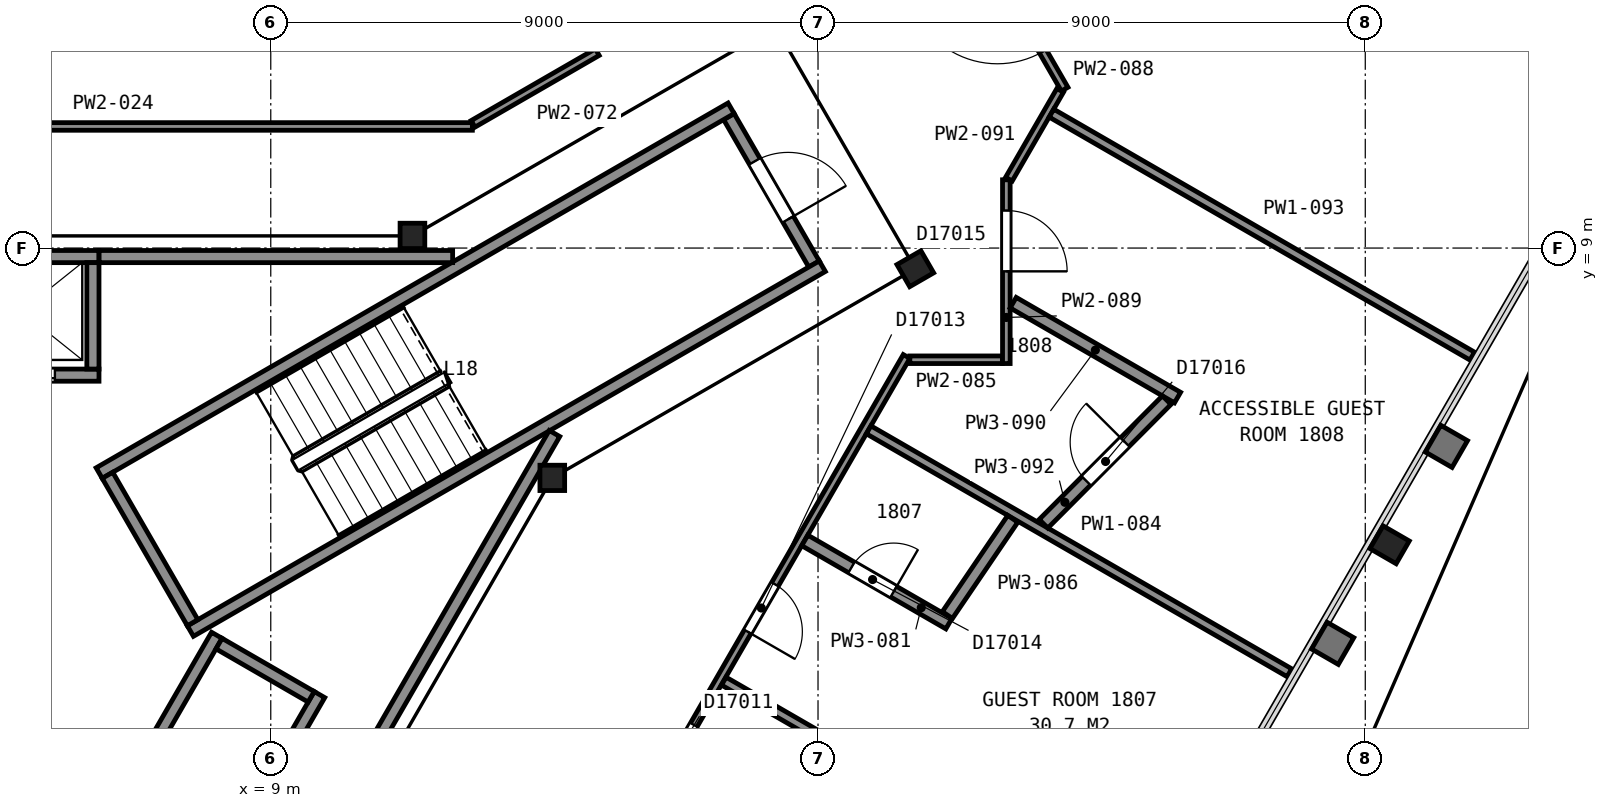
"""IFC4 building model, lengths in metres.
Left out: names, types, materials, properties, quantities, classifications, styles, units other than length and angle.
Written with IfcOpenShell. Run it as: python <this file> out.ifc"""

import sys

from ifc_helpers import new_model, si_unit, direction, frame, frame_2d, origin, origin_2d, place, context, subcontext, project, spatial, rectangle, i_section, extrude, element, fill, save


model = new_model("IFC4")
c1 = context("Model", 3, precision=1e-05, world=origin(), true_north=direction((0.0, 1.0)))
c2 = subcontext(c1, "Body", "Model", "MODEL_VIEW")
j1 = project(units=[si_unit("LENGTHUNIT", "METRE"), si_unit("PLANEANGLEUNIT", "RADIAN")], contexts=[c1])
p1 = place(None, origin())
s1 = spatial("IfcSite", under=j1, at=p1, CompositionType="ELEMENT")
p2 = place(p1, origin())
s2 = spatial("IfcBuilding", under=s1, at=p2, CompositionType="ELEMENT")
p3 = place(p2, frame((0.0, 0.0, 80.0)))
s3 = spatial("IfcBuildingStorey", under=s2, at=p3, CompositionType="ELEMENT", Elevation=80.0)
p4 = place(p3, frame((27.4, 4.12, 0.0), z_axis=(0.0, 0.0, 1.0), x_axis=(-0.5, -0.866025403784, 0.0)))
e1 = element("IfcColumn", 1, at=p4, inside=s3, PredefinedType="COLUMN", context=c2, shape_type="SweptSolid", body=[
    extrude(i_section(OverallWidth=0.432, OverallDepth=0.498, WebThickness=0.056, FlangeThickness=0.089, FilletRadius=0.015, at=origin_2d()), origin(), (0.0, 0.0, 1.0), 3.6),
])
p5 = place(p3, frame((13.63, 5.22, 0.0), z_axis=(0.0, 0.0, 1.0), x_axis=(1.0, 0.0, 0.0)))
e2 = element("IfcColumn", 2, at=p5, inside=s3, PredefinedType="COLUMN", context=c2, shape_type="SweptSolid", body=[
    extrude(i_section(OverallWidth=0.406, OverallDepth=0.417, WebThickness=0.03, FlangeThickness=0.048, FilletRadius=0.015, at=origin_2d()), origin(), (0.0, 0.0, 1.0), 3.6),
])
p6 = place(p3, frame((19.6, 8.66, 0.0), z_axis=(0.0, 0.0, 1.0), x_axis=(0.5, -0.866025403784, 0.0)))
e3 = element("IfcColumn", 3, at=p6, inside=s3, PredefinedType="COLUMN", context=c2, shape_type="SweptSolid", body=[
    extrude(i_section(OverallWidth=0.419, OverallDepth=0.455, WebThickness=0.042, FlangeThickness=0.068, FilletRadius=0.015, at=origin_2d()), origin(), (0.0, 0.0, 1.0), 3.6),
])
p7 = place(p3, frame((11.33, 9.2, 0.0), z_axis=(0.0, 0.0, 1.0), x_axis=(1.0, 0.0, 0.0)))
e4 = element("IfcColumn", 4, at=p7, inside=s3, PredefinedType="COLUMN", context=c2, shape_type="SweptSolid", body=[
    extrude(i_section(OverallWidth=0.406, OverallDepth=0.417, WebThickness=0.03, FlangeThickness=0.048, FilletRadius=0.015, at=origin_2d()), origin(), (0.0, 0.0, 1.0), 3.6),
])
p8 = place(p3, frame((17.934, 8.738, 0.0), z_axis=(0.0, 0.0, 1.0), x_axis=(-0.49998411664, 0.866034573852, 0.0)))
e5 = element("IfcWall", 5, at=p8, inside=s3, PredefinedType="PARTITIONING", context=c2, shape_type="SweptSolid", body=[
    extrude(rectangle(XDim=2.8, YDim=0.2, at=frame_2d((1.4, 0.0))), origin(), (0.0, 0.0, 1.0), 3.35),
])
p9 = place(p8, frame((0.85, 0.0, 0.0)))
e6 = element("IfcOpeningElement", 6, at=p9, cuts=e5, PredefinedType="OPENING", context=c2, shape_type="SweptSolid", body=[
    extrude(rectangle(XDim=1.1, YDim=2.1, at=frame_2d((0.55, 1.05))), frame((0.0, 0.11, 0.0), z_axis=(0.0, -1.0, 0.0), x_axis=(1.0, 0.0, 0.0)), (0.0, 0.0, 1.0), 0.22),
])
for number, where, z_axis, x_axis in (
    (7, (6.178, 5.299, 0.0), (0.0, 0.0, 1.0), (0.866, 0.5, 0.0)),
    (8, (7.678, 2.701, 0.0), (0.0, 0.0, 1.0), (0.866, 0.5, 0.0)),
):
    element("IfcWall", number, at=place(p3, frame(where, z_axis=z_axis, x_axis=x_axis)), inside=s3, PredefinedType="PARTITIONING", context=c2, shape_type="SweptSolid", body=[
        extrude(rectangle(XDim=12.0, YDim=0.2, at=frame_2d((6.0, 0.0))), origin(), (0.0, 0.0, 1.0), 3.35),
    ])
p10 = place(p3, frame((7.715, 2.838, 0.0), z_axis=(0.0, 0.0, 1.0), x_axis=(-0.500049511043, 0.865996816683, 0.0)))
e9 = element("IfcWall", 9, at=p10, inside=s3, PredefinedType="PARTITIONING", context=c2, shape_type="SweptSolid", body=[
    extrude(rectangle(XDim=2.8, YDim=0.2, at=frame_2d((1.4, 0.0))), origin(), (0.0, 0.0, 1.0), 3.35),
])
p11 = place(p3, frame((3.625, 6.91, 0.0), z_axis=(0.0, 0.0, 1.0), x_axis=(1.0, 0.0, 0.0)))
e10 = element("IfcWall", 10, at=p11, inside=s3, PredefinedType="PARTITIONING", context=c2, shape_type="SweptSolid", body=[
    extrude(rectangle(XDim=2.55, YDim=0.2, at=frame_2d((1.275, 0.0))), origin(), (0.0, 0.0, 1.0), 3.6),
])
p12 = place(p11, frame((0.725, 0.0, 0.0)))
e11 = element("IfcOpeningElement", 11, at=p12, cuts=e10, PredefinedType="OPENING", context=c2, shape_type="SweptSolid", body=[
    extrude(rectangle(XDim=1.1, YDim=2.1, at=frame_2d((0.55, 1.05))), frame((0.0, 0.11, 0.0), z_axis=(0.0, -1.0, 0.0), x_axis=(1.0, 0.0, 0.0)), (0.0, 0.0, 1.0), 0.22),
])
p13 = place(p3, frame((3.625, 8.86, 0.0), z_axis=(0.0, 0.0, 1.0), x_axis=(1.0, 0.0, 0.0)))
e12 = element("IfcWall", 12, at=p13, inside=s3, PredefinedType="PARTITIONING", context=c2, shape_type="SweptSolid", body=[
    extrude(rectangle(XDim=2.55, YDim=0.2, at=frame_2d((1.275, 0.0))), origin(), (0.0, 0.0, 1.0), 3.6),
])
p14 = place(p3, frame((7.451, -2.414, 0.0), z_axis=(0.0, 0.0, 1.0), x_axis=(0.500016218704, 0.866016039709, 0.0)))
e13 = element("IfcWall", 13, at=p14, inside=s3, PredefinedType="PARTITIONING", context=c2, shape_type="SweptSolid", body=[
    extrude(rectangle(XDim=4.7, YDim=0.2, at=frame_2d((2.35, 0.0))), origin(), (0.0, 0.0, 1.0), 3.6),
])
p15 = place(p3, frame((5.663, -1.612, 0.0), z_axis=(0.0, 0.0, 1.0), x_axis=(0.49998122708, 0.866036242063, 0.0)))
e14 = element("IfcWall", 14, at=p15, inside=s3, PredefinedType="PARTITIONING", context=c2, shape_type="SweptSolid", body=[
    extrude(rectangle(XDim=4.9, YDim=0.2, at=frame_2d((2.45, 0.0))), origin(), (0.0, 0.0, 1.0), 3.6),
])
p16 = place(p3, frame((6.075, 7.01, 0.0), z_axis=(0.0, 0.0, 1.0), x_axis=(0.0, 1.0, 0.0)))
e15 = element("IfcWall", 15, at=p16, inside=s3, PredefinedType="PARTITIONING", context=c2, shape_type="SweptSolid", body=[
    extrude(rectangle(XDim=1.75, YDim=0.2, at=frame_2d((0.875, 0.0))), origin(), (0.0, 0.0, 1.0), 3.6),
])
p17 = place(p3, frame((9.665, 1.62, 0.0), z_axis=(0.0, 0.0, 1.0), x_axis=(-0.866002029911, 0.500040482552, 0.0)))
e16 = element("IfcWall", 16, at=p17, inside=s3, PredefinedType="PARTITIONING", context=c2, shape_type="SweptSolid", body=[
    extrude(rectangle(XDim=1.75, YDim=0.2, at=frame_2d((0.875, 0.0))), origin(), (0.0, 0.0, 1.0), 3.6),
])
p18 = place(p3, frame((6.177, 8.86, 0.0), z_axis=(0.0, 0.0, 1.0), x_axis=(1.0, 0.0, 0.0)))
e17 = element("IfcWall", 17, at=p18, inside=s3, PredefinedType="PARTITIONING", context=c2, shape_type="SweptSolid", body=[
    extrude(rectangle(XDim=5.814, YDim=0.2, at=frame_2d((2.907, 0.0))), origin(), (0.0, 0.0, 1.0), 3.35),
])
p19 = place(p3, frame((8.492, -3.012, 0.0), z_axis=(0.0, 0.0, 1.0), x_axis=(0.499972957231, 0.866041016371, 0.0)))
e18 = element("IfcWall", 18, at=p19, inside=s3, PredefinedType="PARTITIONING", context=c2, shape_type="SweptSolid", body=[
    extrude(rectangle(XDim=10.349, YDim=0.2, at=frame_2d((5.174, 0.0))), origin(), (0.0, 0.0, 1.0), 3.35),
])
p20 = place(p3, frame((-12.315, 11.0, 0.0), z_axis=(0.0, 0.0, 1.0), x_axis=(1.0, 0.0, 0.0)))
e19 = element("IfcWall", 19, at=p20, inside=s3, PredefinedType="PARTITIONING", context=c2, shape_type="SweptSolid", body=[
    extrude(rectangle(XDim=24.631, YDim=0.125, at=frame_2d((12.315, 0.0))), origin(), (0.0, 0.0, 1.0), 2.613),
])
p21 = place(p20, frame((11.812, 0.0, 0.0)))
e20 = element("IfcOpeningElement", 20, at=p21, cuts=e19, PredefinedType="OPENING", context=c2, shape_type="SweptSolid", body=[
    extrude(rectangle(XDim=1.0, YDim=2.1, at=frame_2d((0.5, 1.05))), frame((0.0, 0.073, 0.0), z_axis=(0.0, -1.0, 0.0), x_axis=(1.0, 0.0, 0.0)), (0.0, 0.0, 1.0), 0.145),
])
p22 = place(p3, frame((19.456, 7.217, 0.0), z_axis=(0.0, 0.0, 1.0), x_axis=(-0.50002170027, -0.866012874765, 0.0)))
e21 = element("IfcWall", 21, at=p22, inside=s3, PredefinedType="PARTITIONING", context=c2, shape_type="SweptSolid", body=[
    extrude(rectangle(XDim=31.379, YDim=0.125, at=frame_2d((15.69, 0.0))), origin(), (0.0, 0.0, 1.0), 2.613),
])
p23 = place(p22, frame((26.843, 0.0, 0.0)))
e22 = element("IfcOpeningElement", 22, at=p23, cuts=e21, PredefinedType="OPENING", context=c2, shape_type="SweptSolid", body=[
    extrude(rectangle(XDim=1.0, YDim=2.1, at=frame_2d((0.5, 1.05))), frame((0.0, 0.073, 0.0), z_axis=(0.0, -1.0, 0.0), x_axis=(1.0, 0.0, 0.0)), (0.0, 0.0, 1.0), 0.145),
])
p24 = place(p22, frame((24.03, 0.0, 0.0)))
e23 = element("IfcOpeningElement", 23, at=p24, cuts=e21, PredefinedType="OPENING", context=c2, shape_type="SweptSolid", body=[
    extrude(rectangle(XDim=0.9, YDim=2.1, at=frame_2d((0.45, 1.05))), frame((0.0, 0.073, 0.0), z_axis=(0.0, -1.0, 0.0), x_axis=(1.0, 0.0, 0.0)), (0.0, 0.0, 1.0), 0.145),
])
p25 = place(p22, frame((17.159, 0.0, 0.0)))
e24 = element("IfcOpeningElement", 24, at=p25, cuts=e21, PredefinedType="OPENING", context=c2, shape_type="SweptSolid", body=[
    extrude(rectangle(XDim=0.9, YDim=2.1, at=frame_2d((0.45, 1.05))), frame((0.0, 0.073, 0.0), z_axis=(0.0, -1.0, 0.0), x_axis=(1.0, 0.0, 0.0)), (0.0, 0.0, 1.0), 0.145),
])
p26 = place(p22, frame((14.24, 0.0, 0.0)))
e25 = element("IfcOpeningElement", 25, at=p26, cuts=e21, PredefinedType="OPENING", context=c2, shape_type="SweptSolid", body=[
    extrude(rectangle(XDim=0.9, YDim=2.1, at=frame_2d((0.45, 1.05))), frame((0.0, 0.073, 0.0), z_axis=(0.0, -1.0, 0.0), x_axis=(1.0, 0.0, 0.0)), (0.0, 0.0, 1.0), 0.145),
])
p27 = place(p22, frame((6.997, 0.0, 0.0)))
e26 = element("IfcOpeningElement", 26, at=p27, cuts=e21, PredefinedType="OPENING", context=c2, shape_type="SweptSolid", body=[
    extrude(rectangle(XDim=0.9, YDim=2.1, at=frame_2d((0.45, 1.05))), frame((0.0, 0.073, 0.0), z_axis=(0.0, -1.0, 0.0), x_axis=(1.0, 0.0, 0.0)), (0.0, 0.0, 1.0), 0.145),
])
p28 = place(p22, frame((4.327, 0.0, 0.0)))
e27 = element("IfcOpeningElement", 27, at=p28, cuts=e21, PredefinedType="OPENING", context=c2, shape_type="SweptSolid", body=[
    extrude(rectangle(XDim=0.9, YDim=2.1, at=frame_2d((0.45, 1.05))), frame((0.0, 0.073, 0.0), z_axis=(0.0, -1.0, 0.0), x_axis=(1.0, 0.0, 0.0)), (0.0, 0.0, 1.0), 0.145),
])
p29 = place(p3, frame((12.327, 11.042, 0.0), z_axis=(0.0, 0.0, 1.0), x_axis=(0.866063239147, 0.499934461503, 0.0)))
e28 = element("IfcWall", 28, at=p29, inside=s3, PredefinedType="PARTITIONING", context=c2, shape_type="SweptSolid", body=[
    extrude(rectangle(XDim=2.359, YDim=0.125, at=frame_2d((1.18, 0.0))), origin(), (0.0, 0.0, 1.0), 2.613),
])
p30 = place(p3, frame((16.45, 1.877, 0.0), z_axis=(0.0, 0.0, 1.0), x_axis=(0.866052736899, -0.499952654668, 0.0)))
e29 = element("IfcWall", 29, at=p30, inside=s3, PredefinedType="PARTITIONING", context=c2, shape_type="SweptSolid", body=[
    extrude(rectangle(XDim=7.987, YDim=0.15, at=frame_2d((3.994, 0.0))), origin(), (0.0, 0.0, 1.0), 2.613),
])
p31 = place(p3, frame((17.782, 4.192, 0.0), z_axis=(0.0, 0.0, 1.0), x_axis=(0.866005850709, -0.50003386539, 0.0)))
e30 = element("IfcWall", 30, at=p31, inside=s3, PredefinedType="PARTITIONING", context=c2, shape_type="SweptSolid", body=[
    extrude(rectangle(XDim=2.737, YDim=0.2, at=frame_2d((1.369, 0.0))), origin(), (0.0, 0.0, 1.0), 2.613),
])
p32 = place(p31, frame((0.887, 0.0, 0.0)))
e31 = element("IfcOpeningElement", 31, at=p32, cuts=e30, PredefinedType="OPENING", context=c2, shape_type="SweptSolid", body=[
    extrude(rectangle(XDim=0.8, YDim=2.1, at=frame_2d((0.4, 1.05))), frame((0.0, 0.11, 0.0), z_axis=(0.0, -1.0, 0.0), x_axis=(1.0, 0.0, 0.0)), (0.0, 0.0, 1.0), 0.22),
])
p33 = place(p3, frame((18.832, 6.011, 0.0), z_axis=(0.0, 0.0, 1.0), x_axis=(0.866027362729, -0.499996606993, 0.0)))
e32 = element("IfcWall", 32, at=p33, inside=s3, PredefinedType="PARTITIONING", context=c2, shape_type="SweptSolid", body=[
    extrude(rectangle(XDim=7.991, YDim=0.15, at=frame_2d((3.996, 0.0))), origin(), (0.0, 0.0, 1.0), 2.613),
])
p34 = place(p3, frame((19.51, 7.163, 0.0), z_axis=(0.0, 0.0, 1.0), x_axis=(1.0, 0.0, 0.0)))
e33 = element("IfcWall", 33, at=p34, inside=s3, PredefinedType="PARTITIONING", context=c2, shape_type="SweptSolid", body=[
    extrude(rectangle(XDim=1.522, YDim=0.125, at=frame_2d((0.761, 0.0))), origin(), (0.0, 0.0, 1.0), 2.613),
])
p35 = place(p3, frame((20.128, 2.964, 0.0), z_axis=(0.0, 0.0, 1.0), x_axis=(0.561894569182, 0.827208857015, 0.0)))
e34 = element("IfcWall", 34, at=p35, inside=s3, PredefinedType="PARTITIONING", context=c2, shape_type="SweptSolid", body=[
    extrude(rectangle(XDim=1.913, YDim=0.2, at=frame_2d((0.957, 0.0))), origin(), (0.0, 0.0, 1.0), 2.613),
])
p36 = place(p3, frame((20.643, 14.063, 0.0), z_axis=(0.0, 0.0, 1.0), x_axis=(0.499647745683, -0.866228682412, 0.0)))
e35 = element("IfcWall", 35, at=p36, inside=s3, PredefinedType="PARTITIONING", context=c2, shape_type="SweptSolid", body=[
    extrude(rectangle(XDim=2.829, YDim=0.125, at=frame_2d((1.415, 0.0))), origin(), (0.0, 0.0, 1.0), 2.613),
])
p37 = place(p36, frame((0.615, 0.0, 0.0)))
e36 = element("IfcOpeningElement", 36, at=p37, cuts=e35, PredefinedType="OPENING", context=c2, shape_type="SweptSolid", body=[
    extrude(rectangle(XDim=1.5, YDim=2.1, at=frame_2d((0.75, 1.05))), frame((0.0, 0.073, 0.0), z_axis=(0.0, -1.0, 0.0), x_axis=(1.0, 0.0, 0.0)), (0.0, 0.0, 1.0), 0.145),
])
p38 = place(p3, frame((21.097, 10.123, 0.0), z_axis=(0.0, 0.0, 1.0), x_axis=(0.0, -1.0, 0.0)))
e37 = element("IfcWall", 37, at=p38, inside=s3, PredefinedType="PARTITIONING", context=c2, shape_type="SweptSolid", body=[
    extrude(rectangle(XDim=3.022, YDim=0.125, at=frame_2d((1.511, 0.0))), origin(), (0.0, 0.0, 1.0), 2.613),
])
p39 = place(p38, frame((0.506, 0.0, 0.0)))
e38 = element("IfcOpeningElement", 38, at=p39, cuts=e37, PredefinedType="OPENING", context=c2, shape_type="SweptSolid", body=[
    extrude(rectangle(XDim=1.0, YDim=2.1, at=frame_2d((0.5, 1.05))), frame((0.0, 0.073, 0.0), z_axis=(0.0, -1.0, 0.0), x_axis=(1.0, 0.0, 0.0)), (0.0, 0.0, 1.0), 0.145),
])
p40 = place(p3, frame((21.209, 8.102, 0.0), z_axis=(0.0, 0.0, 1.0), x_axis=(0.86597196262, -0.50009255139, 0.0)))
e39 = element("IfcWall", 39, at=p40, inside=s3, PredefinedType="PARTITIONING", context=c2, shape_type="SweptSolid", body=[
    extrude(rectangle(XDim=3.122, YDim=0.2, at=frame_2d((1.561, 0.0))), origin(), (0.0, 0.0, 1.0), 2.613),
])
p41 = place(p3, frame((21.139, 10.134, 0.0), z_axis=(0.0, 0.0, 1.0), x_axis=(0.500048373822, 0.865997473344, 0.0)))
e40 = element("IfcWall", 40, at=p41, inside=s3, PredefinedType="PARTITIONING", context=c2, shape_type="SweptSolid", body=[
    extrude(rectangle(XDim=1.686, YDim=0.125, at=frame_2d((0.843, 0.0))), origin(), (0.0, 0.0, 1.0), 2.613),
])
p42 = place(p3, frame((21.708, 4.466, 0.0), z_axis=(0.0, 0.0, 1.0), x_axis=(0.70578703929, 0.708424064506, 0.0)))
e41 = element("IfcWall", 41, at=p42, inside=s3, PredefinedType="PARTITIONING", context=c2, shape_type="SweptSolid", body=[
    extrude(rectangle(XDim=2.87, YDim=0.2, at=frame_2d((1.435, 0.0))), origin(), (0.0, 0.0, 1.0), 2.613),
])
p43 = place(p42, frame((0.996, 0.0, 0.0)))
e42 = element("IfcOpeningElement", 42, at=p43, cuts=e41, PredefinedType="OPENING", context=c2, shape_type="SweptSolid", body=[
    extrude(rectangle(XDim=0.9, YDim=2.1, at=frame_2d((0.45, 1.05))), frame((0.0, 0.11, 0.0), z_axis=(0.0, -1.0, 0.0), x_axis=(1.0, 0.0, 0.0)), (0.0, 0.0, 1.0), 0.22),
])
p44 = place(p3, frame((21.839, 11.219, 0.0), z_axis=(0.0, 0.0, 1.0), x_axis=(0.866019724796, -0.500009836168, 0.0)))
e43 = element("IfcWall", 43, at=p44, inside=s3, PredefinedType="PARTITIONING", context=c2, shape_type="SweptSolid", body=[
    extrude(rectangle(XDim=7.991, YDim=0.15, at=frame_2d((3.996, 0.0))), origin(), (0.0, 0.0, 1.0), 2.613),
])
p45 = place(p9, origin())
e44 = element("IfcDoor", 44, at=p45, inside=s3, OperationType="SINGLE_SWING_LEFT", PredefinedType="DOOR", context=c2, shape_type="SweptSolid", body=[
    extrude(rectangle(XDim=1.1, YDim=2.1, at=frame_2d((0.55, 1.05))), frame((0.0, 0.025, 0.0), z_axis=(0.0, -1.0, 0.0), x_axis=(1.0, 0.0, 0.0)), (0.0, 0.0, 1.0), 0.05),
])
fill(e6, e44)
p46 = place(p12, origin())
e45 = element("IfcDoor", 45, at=p46, inside=s3, OperationType="SLIDING_TO_LEFT", PredefinedType="DOOR", context=c2, shape_type="SweptSolid", body=[
    extrude(rectangle(XDim=1.1, YDim=2.1, at=frame_2d((0.55, 1.05))), frame((0.0, 0.025, 0.0), z_axis=(0.0, -1.0, 0.0), x_axis=(1.0, 0.0, 0.0)), (0.0, 0.0, 1.0), 0.05),
])
fill(e11, e45)
p47 = place(p27, origin())
e46 = element("IfcDoor", 46, at=p47, inside=s3, OperationType="SINGLE_SWING_RIGHT", PredefinedType="DOOR", context=c2, shape_type="SweptSolid", body=[
    extrude(rectangle(XDim=0.9, YDim=2.1, at=frame_2d((0.45, 1.05))), frame((0.0, 0.025, 0.0), z_axis=(0.0, -1.0, 0.0), x_axis=(1.0, 0.0, 0.0)), (0.0, 0.0, 1.0), 0.05),
])
fill(e26, e46)
p48 = place(p28, origin())
e47 = element("IfcDoor", 47, at=p48, inside=s3, OperationType="SINGLE_SWING_RIGHT", PredefinedType="DOOR", context=c2, shape_type="SweptSolid", body=[
    extrude(rectangle(XDim=0.9, YDim=2.1, at=frame_2d((0.45, 1.05))), frame((0.0, 0.025, 0.0), z_axis=(0.0, -1.0, 0.0), x_axis=(1.0, 0.0, 0.0)), (0.0, 0.0, 1.0), 0.05),
])
fill(e27, e47)
p49 = place(p32, origin())
e48 = element("IfcDoor", 48, at=p49, inside=s3, OperationType="SINGLE_SWING_RIGHT", PredefinedType="DOOR", context=c2, shape_type="SweptSolid", body=[
    extrude(rectangle(XDim=0.8, YDim=2.1, at=frame_2d((0.4, 1.05))), frame((0.0, 0.025, 0.0), z_axis=(0.0, -1.0, 0.0), x_axis=(1.0, 0.0, 0.0)), (0.0, 0.0, 1.0), 0.05),
])
fill(e31, e48)
p50 = place(p37, origin())
e49 = element("IfcDoor", 49, at=p50, inside=s3, OperationType="DOUBLE_DOOR_SINGLE_SWING", PredefinedType="DOOR", context=c2, shape_type="SweptSolid", body=[
    extrude(rectangle(XDim=1.5, YDim=2.1, at=frame_2d((0.75, 1.05))), frame((0.0, 0.025, 0.0), z_axis=(0.0, -1.0, 0.0), x_axis=(1.0, 0.0, 0.0)), (0.0, 0.0, 1.0), 0.05),
])
fill(e36, e49)
p51 = place(p39, origin())
e50 = element("IfcDoor", 50, at=p51, inside=s3, OperationType="SINGLE_SWING_RIGHT", PredefinedType="DOOR", context=c2, shape_type="SweptSolid", body=[
    extrude(rectangle(XDim=1.0, YDim=2.1, at=frame_2d((0.5, 1.05))), frame((0.0, 0.025, 0.0), z_axis=(0.0, -1.0, 0.0), x_axis=(1.0, 0.0, 0.0)), (0.0, 0.0, 1.0), 0.05),
])
fill(e38, e50)
p52 = place(p43, origin())
e51 = element("IfcDoor", 51, at=p52, inside=s3, OperationType="SINGLE_SWING_RIGHT", PredefinedType="DOOR", context=c2, shape_type="SweptSolid", body=[
    extrude(rectangle(XDim=0.9, YDim=2.1, at=frame_2d((0.45, 1.05))), frame((0.0, 0.025, 0.0), z_axis=(0.0, -1.0, 0.0), x_axis=(1.0, 0.0, 0.0)), (0.0, 0.0, 1.0), 0.05),
])
fill(e42, e51)
save(model, sys.argv[1])
